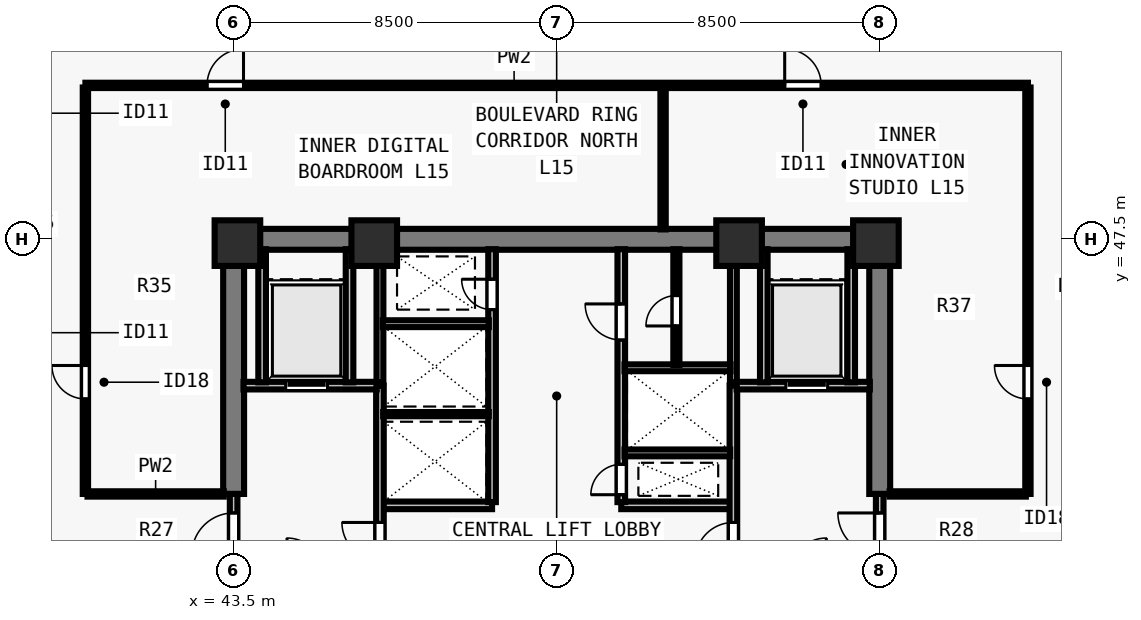
"""IFC4 building model, lengths in metres.
Left out: names, types, materials, properties, quantities, classifications, styles, units other than length and angle.
Written with IfcOpenShell. Run it as: python <this file> out.ifc"""

import sys

from ifc_helpers import new_model, si_unit, direction, frame, frame_2d, origin, origin_2d, place, context, subcontext, project, spatial, rectangle, extrude, element, fill, save


model = new_model("IFC4")
c1 = context("Model", 3, precision=1e-05, world=origin(), true_north=direction((0.0, 1.0)))
c2 = subcontext(c1, "Body", "Model", "MODEL_VIEW")
j1 = project(units=[si_unit("LENGTHUNIT", "METRE"), si_unit("PLANEANGLEUNIT", "RADIAN")], contexts=[c1])
p1 = place(None, origin())
s1 = spatial("IfcSite", under=j1, at=p1, CompositionType="ELEMENT")
p2 = place(p1, origin())
s2 = spatial("IfcBuilding", under=s1, at=p2, CompositionType="ELEMENT")
p3 = place(p2, frame((0.0, 0.0, 58.5)))
s3 = spatial("IfcBuildingStorey", under=s2, at=p3, CompositionType="ELEMENT", Elevation=58.5)
for number, where, z_axis, x_axis in (
    (1, (43.6, 47.4, 0.0), (0.0, 0.0, 1.0), (1.0, 0.0, 0.0)),
    (2, (47.2, 47.4, 0.0), (0.0, 0.0, 1.0), (1.0, 0.0, 0.0)),
    (3, (56.8, 47.4, 0.0), (0.0, 0.0, 1.0), (1.0, 0.0, 0.0)),
    (4, (60.4, 47.4, 0.0), (0.0, 0.0, 1.0), (1.0, 0.0, 0.0)),
):
    element("IfcColumn", number, at=place(p3, frame(where, z_axis=z_axis, x_axis=x_axis)), inside=s3, PredefinedType="COLUMN", context=c2, shape_type="SweptSolid", body=[
        extrude(rectangle(XDim=1.2, YDim=1.2, at=origin_2d()), origin(), (0.0, 0.0, 1.0), 3.5),
    ])
p4 = place(p3, frame((43.225, 47.5, 0.0), z_axis=(0.0, 0.0, 1.0), x_axis=(1.0, 0.0, 0.0)))
e5 = element("IfcWall", 5, at=p4, inside=s3, PredefinedType="SHEAR", context=c2, shape_type="SweptSolid", body=[
    extrude(rectangle(XDim=17.55, YDim=0.55, at=frame_2d((8.775, 0.0))), origin(), (0.0, 0.0, 1.0), 3.28),
])
for number, where, z_axis, x_axis in (
    (6, (43.5, 40.8, 0.0), (0.0, 0.0, 1.0), (0.0, 1.0, 0.0)),
    (7, (60.5, 40.8, 0.0), (0.0, 0.0, 1.0), (0.0, 1.0, 0.0)),
):
    element("IfcWall", number, at=place(p3, frame(where, z_axis=z_axis, x_axis=x_axis)), inside=s3, PredefinedType="SHEAR", context=c2, shape_type="SweptSolid", body=[
        extrude(rectangle(XDim=6.435, YDim=0.55, at=frame_2d((3.218, 0.0))), origin(), (0.0, 0.0, 1.0), 3.28),
    ])
for number, where, z_axis, x_axis in (
    (8, (47.35, 40.5, 0.0), (0.0, 0.0, 1.0), (1.0, 0.0, 0.0)),
    (9, (53.7, 40.5, 0.0), (0.0, 0.0, 1.0), (1.0, 0.0, 0.0)),
):
    element("IfcWall", number, at=place(p3, frame(where, z_axis=z_axis, x_axis=x_axis)), inside=s3, PredefinedType="SOLIDWALL", context=c2, shape_type="SweptSolid", body=[
        extrude(rectangle(XDim=2.95, YDim=0.2, at=frame_2d((1.475, 0.0))), origin(), (0.0, 0.0, 1.0), 3.28),
    ])
p5 = place(p3, frame((50.3, 40.585, 0.0), z_axis=(0.0, 0.0, 1.0), x_axis=(0.0, 1.0, 0.0)))
e10 = element("IfcWall", 10, at=p5, inside=s3, PredefinedType="SOLIDWALL", context=c2, shape_type="SweptSolid", body=[
    extrude(rectangle(XDim=6.655, YDim=0.2, at=frame_2d((3.328, 0.0))), origin(), (0.0, 0.0, 1.0), 3.28),
])
p6 = place(p5, frame((5.065, 0.0, 0.0)))
e11 = element("IfcOpeningElement", 11, at=p6, cuts=e10, PredefinedType="OPENING", context=c2, shape_type="SweptSolid", body=[
    extrude(rectangle(XDim=0.8, YDim=2.08, at=frame_2d((0.4, 1.04))), frame((0.0, 0.11, 0.0), z_axis=(0.0, -1.0, 0.0), x_axis=(1.0, 0.0, 0.0)), (0.0, 0.0, 1.0), 0.22),
])
p7 = place(p3, frame((53.7, 40.585, 0.0), z_axis=(0.0, 0.0, 1.0), x_axis=(0.0, 1.0, 0.0)))
e12 = element("IfcWall", 12, at=p7, inside=s3, PredefinedType="SOLIDWALL", context=c2, shape_type="SweptSolid", body=[
    extrude(rectangle(XDim=6.655, YDim=0.2, at=frame_2d((3.328, 0.0))), origin(), (0.0, 0.0, 1.0), 3.28),
])
p8 = place(p7, frame((0.195, 0.0, 0.0)))
e13 = element("IfcOpeningElement", 13, at=p8, cuts=e12, PredefinedType="OPENING", context=c2, shape_type="SweptSolid", body=[
    extrude(rectangle(XDim=0.8, YDim=2.08, at=frame_2d((0.4, 1.04))), frame((0.0, 0.11, 0.0), z_axis=(0.0, -1.0, 0.0), x_axis=(1.0, 0.0, 0.0)), (0.0, 0.0, 1.0), 0.22),
])
p9 = place(p7, frame((4.265, 0.0, 0.0)))
e14 = element("IfcOpeningElement", 14, at=p9, cuts=e12, PredefinedType="OPENING", context=c2, shape_type="SweptSolid", body=[
    extrude(rectangle(XDim=0.95, YDim=2.12, at=frame_2d((0.475, 1.06))), frame((0.0, 0.11, 0.0), z_axis=(0.0, -1.0, 0.0), x_axis=(1.0, 0.0, 0.0)), (0.0, 0.0, 1.0), 0.22),
])
p10 = place(p3, frame((43.5, 38.75, 0.0), z_axis=(0.0, 0.0, 1.0), x_axis=(0.0, 1.0, 0.0)))
e15 = element("IfcWall", 15, at=p10, inside=s3, PredefinedType="SOLIDWALL", context=c2, shape_type="SweptSolid", body=[
    extrude(rectangle(XDim=2.05, YDim=0.2, at=frame_2d((1.025, 0.0))), origin(), (0.0, 0.0, 1.0), 3.28),
])
p11 = place(p10, frame((0.45, 0.0, 0.0)))
e16 = element("IfcOpeningElement", 16, at=p11, cuts=e15, PredefinedType="OPENING", context=c2, shape_type="SweptSolid", body=[
    extrude(rectangle(XDim=1.1, YDim=2.15, at=frame_2d((0.55, 1.075))), frame((0.0, 0.11, 0.0), z_axis=(0.0, -1.0, 0.0), x_axis=(1.0, 0.0, 0.0)), (0.0, 0.0, 1.0), 0.22),
])
p12 = place(p3, frame((47.35, 38.785, 0.0), z_axis=(0.0, 0.0, 1.0), x_axis=(0.0, 1.0, 0.0)))
e17 = element("IfcWall", 17, at=p12, inside=s3, PredefinedType="SOLIDWALL", context=c2, shape_type="SweptSolid", body=[
    extrude(rectangle(XDim=4.865, YDim=0.2, at=frame_2d((2.433, 0.0))), origin(), (0.0, 0.0, 1.0), 3.28),
])
p13 = place(p12, frame((0.265, 0.0, 0.0)))
e18 = element("IfcOpeningElement", 18, at=p13, cuts=e17, PredefinedType="OPENING", context=c2, shape_type="SweptSolid", body=[
    extrude(rectangle(XDim=1.0, YDim=2.15, at=frame_2d((0.5, 1.075))), frame((0.0, 0.11, 0.0), z_axis=(0.0, -1.0, 0.0), x_axis=(1.0, 0.0, 0.0)), (0.0, 0.0, 1.0), 0.22),
])
p14 = place(p3, frame((43.76, 43.65, 0.0), z_axis=(0.0, 0.0, 1.0), x_axis=(1.0, 0.0, 0.0)))
e19 = element("IfcWall", 19, at=p14, inside=s3, PredefinedType="SOLIDWALL", context=c2, shape_type="SweptSolid", body=[
    extrude(rectangle(XDim=3.505, YDim=0.2, at=frame_2d((1.752, 0.0))), origin(), (0.0, 0.0, 1.0), 3.28),
])
p15 = place(p14, frame((1.11, 0.0, 0.0)))
e20 = element("IfcOpeningElement", 20, at=p15, cuts=e19, PredefinedType="OPENING", context=c2, shape_type="SweptSolid", body=[
    extrude(rectangle(XDim=1.1, YDim=2.2, at=frame_2d((0.55, 1.1))), frame((0.0, 0.11, 0.0), z_axis=(0.0, -1.0, 0.0), x_axis=(1.0, 0.0, 0.0)), (0.0, 0.0, 1.0), 0.22),
])
for number, where, z_axis, x_axis in (
    (21, (46.55, 43.735, 0.0), (0.0, 0.0, 1.0), (0.0, 1.0, 0.0)),
    (22, (44.25, 43.735, 0.0), (0.0, 0.0, 1.0), (0.0, 1.0, 0.0)),
):
    element("IfcWall", number, at=place(p3, frame(where, z_axis=z_axis, x_axis=x_axis)), inside=s3, PredefinedType="SOLIDWALL", context=c2, shape_type="SweptSolid", body=[
        extrude(rectangle(XDim=3.505, YDim=0.2, at=frame_2d((1.752, 0.0))), origin(), (0.0, 0.0, 1.0), 3.28),
    ])
p16 = place(p3, frame((60.5, 38.75, 0.0), z_axis=(0.0, 0.0, 1.0), x_axis=(0.0, 1.0, 0.0)))
e23 = element("IfcWall", 23, at=p16, inside=s3, PredefinedType="SOLIDWALL", context=c2, shape_type="SweptSolid", body=[
    extrude(rectangle(XDim=2.05, YDim=0.2, at=frame_2d((1.025, 0.0))), origin(), (0.0, 0.0, 1.0), 3.28),
])
p17 = place(p16, frame((0.45, 0.0, 0.0)))
e24 = element("IfcOpeningElement", 24, at=p17, cuts=e23, PredefinedType="OPENING", context=c2, shape_type="SweptSolid", body=[
    extrude(rectangle(XDim=1.1, YDim=2.15, at=frame_2d((0.55, 1.075))), frame((0.0, 0.11, 0.0), z_axis=(0.0, -1.0, 0.0), x_axis=(1.0, 0.0, 0.0)), (0.0, 0.0, 1.0), 0.22),
])
p18 = place(p3, frame((56.65, 38.785, 0.0), z_axis=(0.0, 0.0, 1.0), x_axis=(0.0, 1.0, 0.0)))
e25 = element("IfcWall", 25, at=p18, inside=s3, PredefinedType="SOLIDWALL", context=c2, shape_type="SweptSolid", body=[
    extrude(rectangle(XDim=4.865, YDim=0.2, at=frame_2d((2.433, 0.0))), origin(), (0.0, 0.0, 1.0), 3.28),
])
p19 = place(p18, frame((0.265, 0.0, 0.0)))
e26 = element("IfcOpeningElement", 26, at=p19, cuts=e25, PredefinedType="OPENING", context=c2, shape_type="SweptSolid", body=[
    extrude(rectangle(XDim=1.0, YDim=2.15, at=frame_2d((0.5, 1.075))), frame((0.0, 0.11, 0.0), z_axis=(0.0, -1.0, 0.0), x_axis=(1.0, 0.0, 0.0)), (0.0, 0.0, 1.0), 0.22),
])
p20 = place(p3, frame((56.735, 43.65, 0.0), z_axis=(0.0, 0.0, 1.0), x_axis=(1.0, 0.0, 0.0)))
e27 = element("IfcWall", 27, at=p20, inside=s3, PredefinedType="SOLIDWALL", context=c2, shape_type="SweptSolid", body=[
    extrude(rectangle(XDim=3.505, YDim=0.2, at=frame_2d((1.752, 0.0))), origin(), (0.0, 0.0, 1.0), 3.28),
])
p21 = place(p20, frame((1.295, 0.0, 0.0)))
e28 = element("IfcOpeningElement", 28, at=p21, cuts=e27, PredefinedType="OPENING", context=c2, shape_type="SweptSolid", body=[
    extrude(rectangle(XDim=1.1, YDim=2.2, at=frame_2d((0.55, 1.1))), frame((0.0, 0.11, 0.0), z_axis=(0.0, -1.0, 0.0), x_axis=(1.0, 0.0, 0.0)), (0.0, 0.0, 1.0), 0.22),
])
for number, where, z_axis, x_axis in (
    (29, (57.45, 43.735, 0.0), (0.0, 0.0, 1.0), (0.0, 1.0, 0.0)),
    (30, (59.75, 43.735, 0.0), (0.0, 0.0, 1.0), (0.0, 1.0, 0.0)),
):
    element("IfcWall", number, at=place(p3, frame(where, z_axis=z_axis, x_axis=x_axis)), inside=s3, PredefinedType="SOLIDWALL", context=c2, shape_type="SweptSolid", body=[
        extrude(rectangle(XDim=3.505, YDim=0.2, at=frame_2d((1.752, 0.0))), origin(), (0.0, 0.0, 1.0), 3.28),
    ])
p22 = place(p3, frame((47.35, 43.735, 0.0), z_axis=(0.0, 0.0, 1.0), x_axis=(0.0, 1.0, 0.0)))
e31 = element("IfcWall", 31, at=p22, inside=s3, PredefinedType="SOLIDWALL", context=c2, shape_type="SweptSolid", body=[
    extrude(rectangle(XDim=3.505, YDim=0.18, at=frame_2d((1.752, 0.0))), origin(), (0.0, 0.0, 1.0), 3.28),
])
p23 = place(p3, frame((47.435, 42.9, 0.0), z_axis=(0.0, 0.0, 1.0), x_axis=(1.0, 0.0, 0.0)))
e32 = element("IfcWall", 32, at=p23, inside=s3, PredefinedType="PARTITIONING", context=c2, shape_type="SweptSolid", body=[
    extrude(rectangle(XDim=2.78, YDim=0.11, at=frame_2d((1.39, 0.0))), origin(), (0.0, 0.0, 1.0), 3.28),
])
p24 = place(p3, frame((47.425, 45.28, 0.0), z_axis=(0.0, 0.0, 1.0), x_axis=(1.0, 0.0, 0.0)))
e33 = element("IfcWall", 33, at=p24, inside=s3, PredefinedType="SOLIDWALL", context=c2, shape_type="SweptSolid", body=[
    extrude(rectangle(XDim=2.79, YDim=0.18, at=frame_2d((1.395, 0.0))), origin(), (0.0, 0.0, 1.0), 3.28),
])
p25 = place(p3, frame((56.65, 43.735, 0.0), z_axis=(0.0, 0.0, 1.0), x_axis=(0.0, 1.0, 0.0)))
e34 = element("IfcWall", 34, at=p25, inside=s3, PredefinedType="SOLIDWALL", context=c2, shape_type="SweptSolid", body=[
    extrude(rectangle(XDim=3.505, YDim=0.18, at=frame_2d((1.752, 0.0))), origin(), (0.0, 0.0, 1.0), 3.28),
])
p26 = place(p3, frame((53.785, 41.88, 0.0), z_axis=(0.0, 0.0, 1.0), x_axis=(1.0, 0.0, 0.0)))
e35 = element("IfcWall", 35, at=p26, inside=s3, PredefinedType="SOLIDWALL", context=c2, shape_type="SweptSolid", body=[
    extrude(rectangle(XDim=2.78, YDim=0.18, at=frame_2d((1.39, 0.0))), origin(), (0.0, 0.0, 1.0), 3.28),
])
p27 = place(p3, frame((53.785, 44.12, 0.0), z_axis=(0.0, 0.0, 1.0), x_axis=(1.0, 0.0, 0.0)))
e36 = element("IfcWall", 36, at=p27, inside=s3, PredefinedType="SOLIDWALL", context=c2, shape_type="SweptSolid", body=[
    extrude(rectangle(XDim=2.79, YDim=0.18, at=frame_2d((1.395, 0.0))), origin(), (0.0, 0.0, 1.0), 3.28),
])
p28 = place(p3, frame((55.15, 44.195, 0.0), z_axis=(0.0, 0.0, 1.0), x_axis=(0.0, 1.0, 0.0)))
e37 = element("IfcWall", 37, at=p28, inside=s3, PredefinedType="PARTITIONING", context=c2, shape_type="SweptSolid", body=[
    extrude(rectangle(XDim=3.045, YDim=0.16, at=frame_2d((1.522, 0.0))), origin(), (0.0, 0.0, 1.0), 3.28),
])
p29 = place(p28, frame((1.025, 0.0, 0.0)))
e38 = element("IfcOpeningElement", 38, at=p29, cuts=e37, PredefinedType="OPENING", context=c2, shape_type="SweptSolid", body=[
    extrude(rectangle(XDim=0.8, YDim=2.1, at=frame_2d((0.4, 1.05))), frame((0.0, 0.09, 0.0), z_axis=(0.0, -1.0, 0.0), x_axis=(1.0, 0.0, 0.0)), (0.0, 0.0, 1.0), 0.18),
])
p30 = place(p3, frame((39.6, 51.55, 0.0), z_axis=(0.0, 0.0, 1.0), x_axis=(1.0, 0.0, 0.0)))
e39 = element("IfcWall", 39, at=p30, inside=s3, PredefinedType="PARTITIONING", context=c2, shape_type="SweptSolid", body=[
    extrude(rectangle(XDim=24.8, YDim=0.14, at=frame_2d((12.4, 0.0))), origin(), (0.0, 0.0, 1.0), 3.28),
])
p31 = place(p30, frame((3.2, 0.0, 0.0)))
e40 = element("IfcOpeningElement", 40, at=p31, cuts=e39, PredefinedType="OPENING", context=c2, shape_type="SweptSolid", body=[
    extrude(rectangle(XDim=0.96, YDim=2.12, at=frame_2d((0.48, 1.06))), frame((0.0, 0.08, 0.0), z_axis=(0.0, -1.0, 0.0), x_axis=(1.0, 0.0, 0.0)), (0.0, 0.0, 1.0), 0.16),
])
p32 = place(p30, frame((18.4, 0.0, 0.0)))
e41 = element("IfcOpeningElement", 41, at=p32, cuts=e39, PredefinedType="OPENING", context=c2, shape_type="SweptSolid", body=[
    extrude(rectangle(XDim=0.96, YDim=2.12, at=frame_2d((0.48, 1.06))), frame((0.0, 0.08, 0.0), z_axis=(0.0, -1.0, 0.0), x_axis=(1.0, 0.0, 0.0)), (0.0, 0.0, 1.0), 0.16),
])
p33 = place(p3, frame((39.6, 40.8, 0.0), z_axis=(0.0, 0.0, 1.0), x_axis=(0.0, 1.0, 0.0)))
e42 = element("IfcWall", 42, at=p33, inside=s3, PredefinedType="PARTITIONING", context=c2, shape_type="SweptSolid", body=[
    extrude(rectangle(XDim=10.695, YDim=0.14, at=frame_2d((5.348, 0.0))), origin(), (0.0, 0.0, 1.0), 3.28),
])
p34 = place(p33, frame((2.5, 0.0, 0.0)))
e43 = element("IfcOpeningElement", 43, at=p34, cuts=e42, PredefinedType="OPENING", context=c2, shape_type="SweptSolid", body=[
    extrude(rectangle(XDim=0.88, YDim=2.1, at=frame_2d((0.44, 1.05))), frame((0.0, 0.08, 0.0), z_axis=(0.0, -1.0, 0.0), x_axis=(1.0, 0.0, 0.0)), (0.0, 0.0, 1.0), 0.16),
])
p35 = place(p3, frame((39.655, 40.8, 0.0), z_axis=(0.0, 0.0, 1.0), x_axis=(1.0, 0.0, 0.0)))
e44 = element("IfcWall", 44, at=p35, inside=s3, PredefinedType="PARTITIONING", context=c2, shape_type="SweptSolid", body=[
    extrude(rectangle(XDim=3.585, YDim=0.14, at=frame_2d((1.792, 0.0))), origin(), (0.0, 0.0, 1.0), 3.28),
])
p36 = place(p3, frame((64.4, 40.8, 0.0), z_axis=(0.0, 0.0, 1.0), x_axis=(0.0, 1.0, 0.0)))
e45 = element("IfcWall", 45, at=p36, inside=s3, PredefinedType="PARTITIONING", context=c2, shape_type="SweptSolid", body=[
    extrude(rectangle(XDim=10.695, YDim=0.14, at=frame_2d((5.348, 0.0))), origin(), (0.0, 0.0, 1.0), 3.28),
])
p37 = place(p36, frame((2.5, 0.0, 0.0)))
e46 = element("IfcOpeningElement", 46, at=p37, cuts=e45, PredefinedType="OPENING", context=c2, shape_type="SweptSolid", body=[
    extrude(rectangle(XDim=0.88, YDim=2.1, at=frame_2d((0.44, 1.05))), frame((0.0, 0.08, 0.0), z_axis=(0.0, -1.0, 0.0), x_axis=(1.0, 0.0, 0.0)), (0.0, 0.0, 1.0), 0.16),
])
p38 = place(p3, frame((60.76, 40.8, 0.0), z_axis=(0.0, 0.0, 1.0), x_axis=(1.0, 0.0, 0.0)))
e47 = element("IfcWall", 47, at=p38, inside=s3, PredefinedType="PARTITIONING", context=c2, shape_type="SweptSolid", body=[
    extrude(rectangle(XDim=3.585, YDim=0.14, at=frame_2d((1.792, 0.0))), origin(), (0.0, 0.0, 1.0), 3.28),
])
p39 = place(p3, frame((54.8, 47.76, 0.0), z_axis=(0.0, 0.0, 1.0), x_axis=(0.0, 1.0, 0.0)))
e48 = element("IfcWall", 48, at=p39, inside=s3, PredefinedType="PARTITIONING", context=c2, shape_type="SweptSolid", body=[
    extrude(rectangle(XDim=3.735, YDim=0.14, at=frame_2d((1.868, 0.0))), origin(), (0.0, 0.0, 1.0), 3.28),
])
p40 = place(p11, origin())
e49 = element("IfcDoor", 49, at=p40, inside=s3, OperationType="SINGLE_SWING_LEFT", PredefinedType="DOOR", context=c2, shape_type="SweptSolid", body=[
    extrude(rectangle(XDim=1.1, YDim=2.15, at=frame_2d((0.55, 1.075))), frame((0.0, 0.025, 0.0), z_axis=(0.0, -1.0, 0.0), x_axis=(1.0, 0.0, 0.0)), (0.0, 0.0, 1.0), 0.05),
])
fill(e16, e49)
p41 = place(p13, origin())
e50 = element("IfcDoor", 50, at=p41, inside=s3, OperationType="SINGLE_SWING_RIGHT", PredefinedType="DOOR", context=c2, shape_type="SweptSolid", body=[
    extrude(rectangle(XDim=1.0, YDim=2.15, at=frame_2d((0.5, 1.075))), frame((0.0, 0.025, 0.0), z_axis=(0.0, -1.0, 0.0), x_axis=(1.0, 0.0, 0.0)), (0.0, 0.0, 1.0), 0.05),
])
fill(e18, e50)
p42 = place(p15, origin())
e51 = element("IfcDoor", 51, at=p42, inside=s3, OperationType="SLIDING_TO_LEFT", PredefinedType="DOOR", context=c2, shape_type="SweptSolid", body=[
    extrude(rectangle(XDim=1.1, YDim=2.2, at=frame_2d((0.55, 1.1))), frame((0.0, 0.025, 0.0), z_axis=(0.0, -1.0, 0.0), x_axis=(1.0, 0.0, 0.0)), (0.0, 0.0, 1.0), 0.05),
])
fill(e20, e51)
p43 = place(p17, origin())
e52 = element("IfcDoor", 52, at=p43, inside=s3, OperationType="SINGLE_SWING_RIGHT", PredefinedType="DOOR", context=c2, shape_type="SweptSolid", body=[
    extrude(rectangle(XDim=1.1, YDim=2.15, at=frame_2d((0.55, 1.075))), frame((0.0, 0.025, 0.0), z_axis=(0.0, -1.0, 0.0), x_axis=(1.0, 0.0, 0.0)), (0.0, 0.0, 1.0), 0.05),
])
fill(e24, e52)
p44 = place(p19, origin())
e53 = element("IfcDoor", 53, at=p44, inside=s3, OperationType="SINGLE_SWING_LEFT", PredefinedType="DOOR", context=c2, shape_type="SweptSolid", body=[
    extrude(rectangle(XDim=1.0, YDim=2.15, at=frame_2d((0.5, 1.075))), frame((0.0, 0.025, 0.0), z_axis=(0.0, -1.0, 0.0), x_axis=(1.0, 0.0, 0.0)), (0.0, 0.0, 1.0), 0.05),
])
fill(e26, e53)
p45 = place(p21, origin())
e54 = element("IfcDoor", 54, at=p45, inside=s3, OperationType="SLIDING_TO_LEFT", PredefinedType="DOOR", context=c2, shape_type="SweptSolid", body=[
    extrude(rectangle(XDim=1.1, YDim=2.2, at=frame_2d((0.55, 1.1))), frame((0.0, 0.025, 0.0), z_axis=(0.0, -1.0, 0.0), x_axis=(1.0, 0.0, 0.0)), (0.0, 0.0, 1.0), 0.05),
])
fill(e28, e54)
p46 = place(p6, origin())
e55 = element("IfcDoor", 55, at=p46, inside=s3, OperationType="SINGLE_SWING_RIGHT", PredefinedType="DOOR", context=c2, shape_type="SweptSolid", body=[
    extrude(rectangle(XDim=0.8, YDim=2.08, at=frame_2d((0.4, 1.04))), frame((0.0, 0.025, 0.0), z_axis=(0.0, -1.0, 0.0), x_axis=(1.0, 0.0, 0.0)), (0.0, 0.0, 1.0), 0.05),
])
fill(e11, e55)
p47 = place(p8, origin())
e56 = element("IfcDoor", 56, at=p47, inside=s3, OperationType="SINGLE_SWING_LEFT", PredefinedType="DOOR", context=c2, shape_type="SweptSolid", body=[
    extrude(rectangle(XDim=0.8, YDim=2.08, at=frame_2d((0.4, 1.04))), frame((0.0, 0.025, 0.0), z_axis=(0.0, -1.0, 0.0), x_axis=(1.0, 0.0, 0.0)), (0.0, 0.0, 1.0), 0.05),
])
fill(e13, e56)
p48 = place(p9, origin())
e57 = element("IfcDoor", 57, at=p48, inside=s3, OperationType="SINGLE_SWING_RIGHT", PredefinedType="DOOR", context=c2, shape_type="SweptSolid", body=[
    extrude(rectangle(XDim=0.95, YDim=2.12, at=frame_2d((0.475, 1.06))), frame((0.0, 0.025, 0.0), z_axis=(0.0, -1.0, 0.0), x_axis=(1.0, 0.0, 0.0)), (0.0, 0.0, 1.0), 0.05),
])
fill(e14, e57)
p49 = place(p29, origin())
e58 = element("IfcDoor", 58, at=p49, inside=s3, OperationType="SINGLE_SWING_LEFT", PredefinedType="DOOR", context=c2, shape_type="SweptSolid", body=[
    extrude(rectangle(XDim=0.8, YDim=2.1, at=frame_2d((0.4, 1.05))), frame((0.0, 0.025, 0.0), z_axis=(0.0, -1.0, 0.0), x_axis=(1.0, 0.0, 0.0)), (0.0, 0.0, 1.0), 0.05),
])
fill(e38, e58)
p50 = place(p31, origin())
e59 = element("IfcDoor", 59, at=p50, inside=s3, OperationType="SINGLE_SWING_RIGHT", PredefinedType="DOOR", context=c2, shape_type="SweptSolid", body=[
    extrude(rectangle(XDim=0.96, YDim=2.12, at=frame_2d((0.48, 1.06))), frame((0.0, 0.025, 0.0), z_axis=(0.0, -1.0, 0.0), x_axis=(1.0, 0.0, 0.0)), (0.0, 0.0, 1.0), 0.05),
])
fill(e40, e59)
p51 = place(p32, origin())
e60 = element("IfcDoor", 60, at=p51, inside=s3, OperationType="SINGLE_SWING_LEFT", PredefinedType="DOOR", context=c2, shape_type="SweptSolid", body=[
    extrude(rectangle(XDim=0.96, YDim=2.12, at=frame_2d((0.48, 1.06))), frame((0.0, 0.025, 0.0), z_axis=(0.0, -1.0, 0.0), x_axis=(1.0, 0.0, 0.0)), (0.0, 0.0, 1.0), 0.05),
])
fill(e41, e60)
p52 = place(p34, origin())
e61 = element("IfcDoor", 61, at=p52, inside=s3, OperationType="SINGLE_SWING_RIGHT", PredefinedType="DOOR", context=c2, shape_type="SweptSolid", body=[
    extrude(rectangle(XDim=0.88, YDim=2.1, at=frame_2d((0.44, 1.05))), frame((0.0, 0.025, 0.0), z_axis=(0.0, -1.0, 0.0), x_axis=(1.0, 0.0, 0.0)), (0.0, 0.0, 1.0), 0.05),
])
fill(e43, e61)
p53 = place(p37, origin())
e62 = element("IfcDoor", 62, at=p53, inside=s3, OperationType="SINGLE_SWING_RIGHT", PredefinedType="DOOR", context=c2, shape_type="SweptSolid", body=[
    extrude(rectangle(XDim=0.88, YDim=2.1, at=frame_2d((0.44, 1.05))), frame((0.0, 0.025, 0.0), z_axis=(0.0, -1.0, 0.0), x_axis=(1.0, 0.0, 0.0)), (0.0, 0.0, 1.0), 0.05),
])
fill(e46, e62)
save(model, sys.argv[1])
